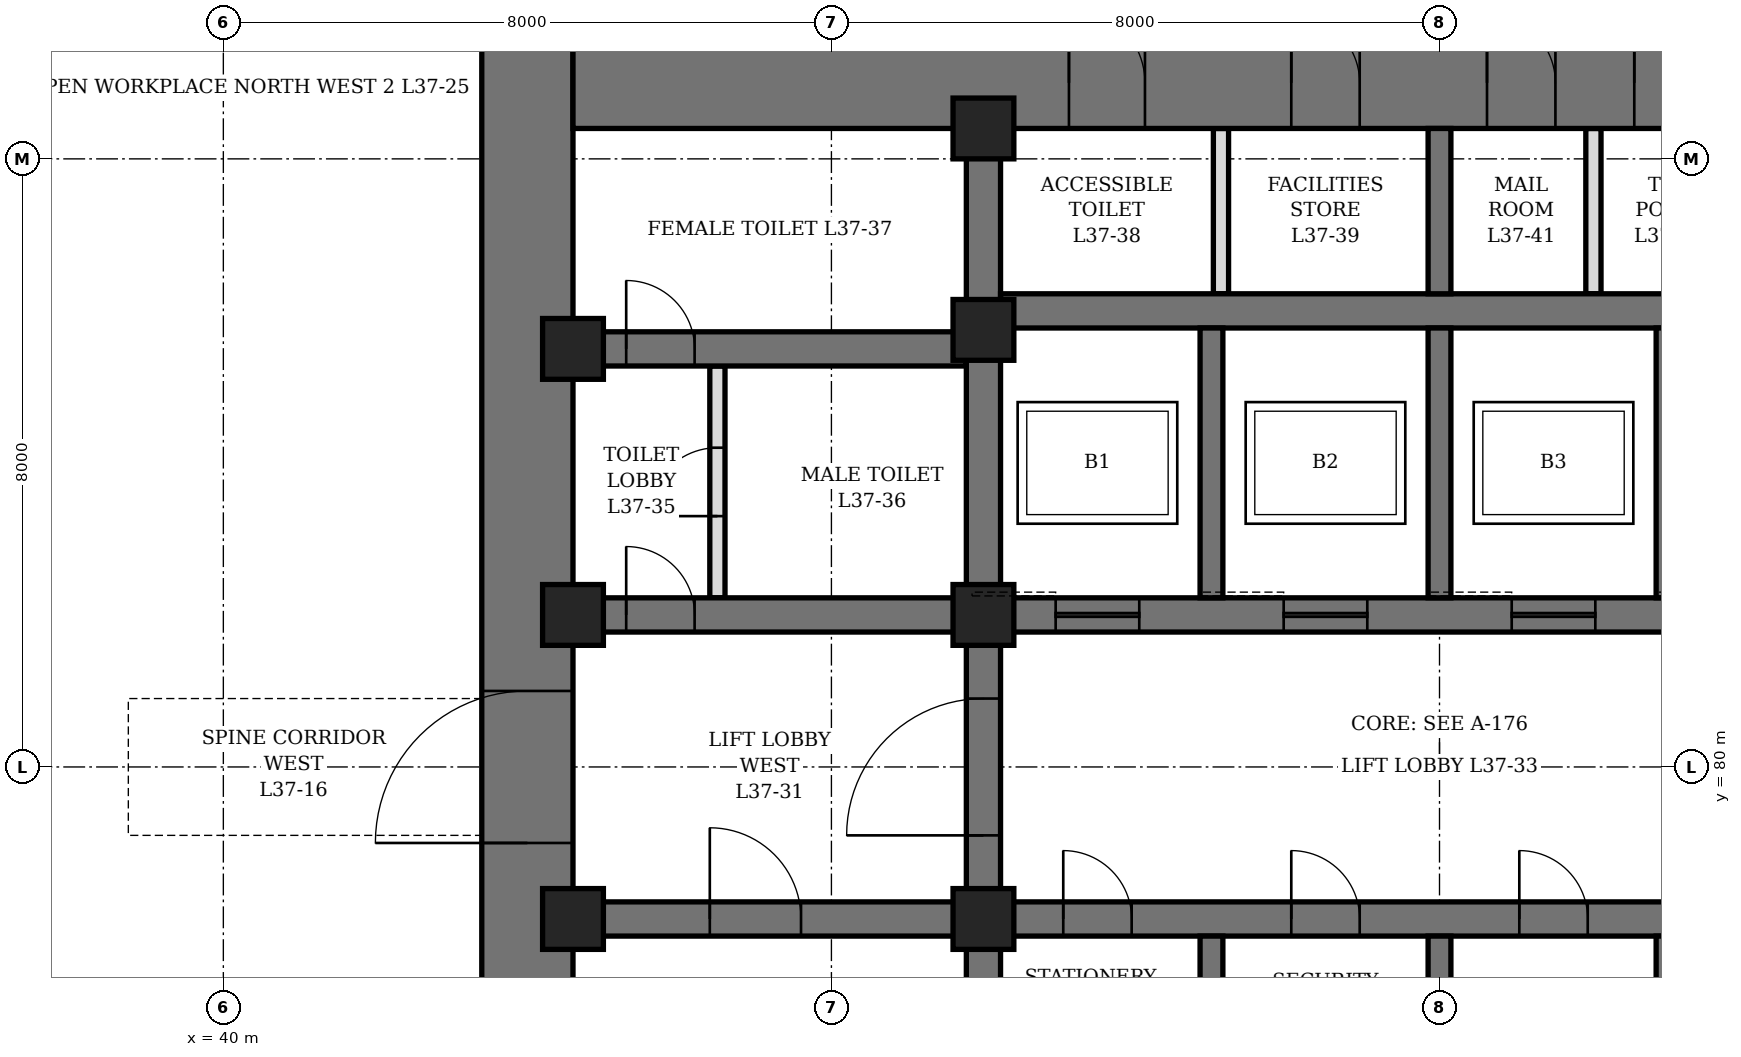
"""IFC4 building model, lengths in metres.
Left out: names, types, materials, properties, quantities, classifications, styles, units other than length and angle.
Written with IfcOpenShell. Run it as: python <this file> out.ifc"""

import sys

from ifc_helpers import new_model, si_unit, direction, frame, frame_2d, origin, origin_2d, place, context, subcontext, project, spatial, rectangle, hollow_rectangle, extrude, element, fill, save


model = new_model("IFC4")
c1 = context("Model", 3, precision=1e-05, world=origin(), true_north=direction((0.0, 1.0)))
c2 = subcontext(c1, "Body", "Model", "MODEL_VIEW")
j1 = project(units=[si_unit("LENGTHUNIT", "METRE"), si_unit("PLANEANGLEUNIT", "RADIAN")], contexts=[c1])
p1 = place(None, origin())
s1 = spatial("IfcSite", under=j1, at=p1, CompositionType="ELEMENT")
p2 = place(p1, origin())
s2 = spatial("IfcBuilding", under=s1, at=p2, CompositionType="ELEMENT")
p3 = place(p2, frame((0.0, 0.0, 166.9)))
s3 = spatial("IfcBuildingStorey", under=s2, at=p3, CompositionType="ELEMENT", Elevation=166.9)
p4 = place(p3, frame((44.0, 70.4, 0.0), z_axis=(0.0, 0.0, 1.0), x_axis=(0.0, 1.0, 0.0)))
e1 = element("IfcWall", 1, at=p4, inside=s3, PredefinedType="SHEAR", context=c2, shape_type="SweptSolid", body=[
    extrude(rectangle(XDim=19.2, YDim=1.2, at=frame_2d((9.6, 0.0))), origin(), (0.0, 0.0, 1.0), 4.2),
])
p5 = place(p4, frame((8.6, 0.0, 0.0)))
e2 = element("IfcOpeningElement", 2, at=p5, cuts=e1, PredefinedType="OPENING", context=c2, shape_type="SweptSolid", body=[
    extrude(rectangle(XDim=2.0, YDim=2.4, at=frame_2d((1.0, 1.2))), frame((0.0, 0.61, 0.0), z_axis=(0.0, -1.0, 0.0), x_axis=(1.0, 0.0, 0.0)), (0.0, 0.0, 1.0), 1.22),
])
p6 = place(p3, frame((44.6, 89.0, 0.0), z_axis=(0.0, 0.0, 1.0), x_axis=(1.0, 0.0, 0.0)))
e3 = element("IfcWall", 3, at=p6, inside=s3, PredefinedType="SHEAR", context=c2, shape_type="SweptSolid", body=[
    extrude(rectangle(XDim=22.8, YDim=1.2, at=frame_2d((11.4, 0.0))), origin(), (0.0, 0.0, 1.0), 4.2),
])
p7 = place(p6, frame((6.525, 0.0, 0.0)))
e4 = element("IfcOpeningElement", 4, at=p7, cuts=e3, PredefinedType="OPENING", context=c2, shape_type="SweptSolid", body=[
    extrude(rectangle(XDim=1.0, YDim=2.1, at=frame_2d((0.5, 1.05))), frame((0.0, 0.61, 0.0), z_axis=(0.0, -1.0, 0.0), x_axis=(1.0, 0.0, 0.0)), (0.0, 0.0, 1.0), 1.22),
])
p8 = place(p6, frame((9.45, 0.0, 0.0)))
e5 = element("IfcOpeningElement", 5, at=p8, cuts=e3, PredefinedType="OPENING", context=c2, shape_type="SweptSolid", body=[
    extrude(rectangle(XDim=0.9, YDim=2.1, at=frame_2d((0.45, 1.05))), frame((0.0, 0.61, 0.0), z_axis=(0.0, -1.0, 0.0), x_axis=(1.0, 0.0, 0.0)), (0.0, 0.0, 1.0), 1.22),
])
p9 = place(p6, frame((12.025, 0.0, 0.0)))
e6 = element("IfcOpeningElement", 6, at=p9, cuts=e3, PredefinedType="OPENING", context=c2, shape_type="SweptSolid", body=[
    extrude(rectangle(XDim=0.9, YDim=2.1, at=frame_2d((0.45, 1.05))), frame((0.0, 0.61, 0.0), z_axis=(0.0, -1.0, 0.0), x_axis=(1.0, 0.0, 0.0)), (0.0, 0.0, 1.0), 1.22),
])
p10 = place(p6, frame((13.962, 0.0, 0.0)))
e7 = element("IfcOpeningElement", 7, at=p10, cuts=e3, PredefinedType="OPENING", context=c2, shape_type="SweptSolid", body=[
    extrude(rectangle(XDim=0.9, YDim=2.1, at=frame_2d((0.45, 1.05))), frame((0.0, 0.61, 0.0), z_axis=(0.0, -1.0, 0.0), x_axis=(1.0, 0.0, 0.0)), (0.0, 0.0, 1.0), 1.22),
])
p11 = place(p3, frame((50.0, 71.6, 0.0), z_axis=(0.0, 0.0, 1.0), x_axis=(0.0, 1.0, 0.0)))
e8 = element("IfcWall", 8, at=p11, inside=s3, PredefinedType="SHEAR", context=c2, shape_type="SweptSolid", body=[
    extrude(rectangle(XDim=16.8, YDim=0.45, at=frame_2d((8.4, 0.0))), origin(), (0.0, 0.0, 1.0), 4.2),
])
p12 = place(p11, frame((7.5, 0.0, 0.0)))
e9 = element("IfcOpeningElement", 9, at=p12, cuts=e8, PredefinedType="OPENING", context=c2, shape_type="SweptSolid", body=[
    extrude(rectangle(XDim=1.8, YDim=2.4, at=frame_2d((0.9, 1.2))), frame((0.0, 0.235, 0.0), z_axis=(0.0, -1.0, 0.0), x_axis=(1.0, 0.0, 0.0)), (0.0, 0.0, 1.0), 0.47),
])
p13 = place(p3, frame((44.6, 78.0, 0.0), z_axis=(0.0, 0.0, 1.0), x_axis=(1.0, 0.0, 0.0)))
e10 = element("IfcWall", 10, at=p13, inside=s3, PredefinedType="SHEAR", context=c2, shape_type="SweptSolid", body=[
    extrude(rectangle(XDim=5.175, YDim=0.45, at=frame_2d((2.587, 0.0))), origin(), (0.0, 0.0, 1.0), 4.2),
])
p14 = place(p13, frame((1.8, 0.0, 0.0)))
e11 = element("IfcOpeningElement", 11, at=p14, cuts=e10, PredefinedType="OPENING", context=c2, shape_type="SweptSolid", body=[
    extrude(rectangle(XDim=1.2, YDim=2.1, at=frame_2d((0.6, 1.05))), frame((0.0, 0.235, 0.0), z_axis=(0.0, -1.0, 0.0), x_axis=(1.0, 0.0, 0.0)), (0.0, 0.0, 1.0), 0.47),
])
p15 = place(p3, frame((44.6, 82.0, 0.0), z_axis=(0.0, 0.0, 1.0), x_axis=(1.0, 0.0, 0.0)))
e12 = element("IfcWall", 12, at=p15, inside=s3, PredefinedType="SHEAR", context=c2, shape_type="SweptSolid", body=[
    extrude(rectangle(XDim=5.175, YDim=0.45, at=frame_2d((2.587, 0.0))), origin(), (0.0, 0.0, 1.0), 4.2),
])
p16 = place(p15, frame((0.7, 0.0, 0.0)))
e13 = element("IfcOpeningElement", 13, at=p16, cuts=e12, PredefinedType="OPENING", context=c2, shape_type="SweptSolid", body=[
    extrude(rectangle(XDim=0.9, YDim=2.1, at=frame_2d((0.45, 1.05))), frame((0.0, 0.235, 0.0), z_axis=(0.0, -1.0, 0.0), x_axis=(1.0, 0.0, 0.0)), (0.0, 0.0, 1.0), 0.47),
])
p17 = place(p3, frame((44.6, 85.5, 0.0), z_axis=(0.0, 0.0, 1.0), x_axis=(1.0, 0.0, 0.0)))
e14 = element("IfcWall", 14, at=p17, inside=s3, PredefinedType="SHEAR", context=c2, shape_type="SweptSolid", body=[
    extrude(rectangle(XDim=5.175, YDim=0.45, at=frame_2d((2.587, 0.0))), origin(), (0.0, 0.0, 1.0), 4.2),
])
p18 = place(p17, frame((0.7, 0.0, 0.0)))
e15 = element("IfcOpeningElement", 15, at=p18, cuts=e14, PredefinedType="OPENING", context=c2, shape_type="SweptSolid", body=[
    extrude(rectangle(XDim=0.9, YDim=2.1, at=frame_2d((0.45, 1.05))), frame((0.0, 0.235, 0.0), z_axis=(0.0, -1.0, 0.0), x_axis=(1.0, 0.0, 0.0)), (0.0, 0.0, 1.0), 0.47),
])
p19 = place(p3, frame((50.225, 78.0, 0.0), z_axis=(0.0, 0.0, 1.0), x_axis=(1.0, 0.0, 0.0)))
e16 = element("IfcWall", 16, at=p19, inside=s3, PredefinedType="SHEAR", context=c2, shape_type="SweptSolid", body=[
    extrude(rectangle(XDim=11.55, YDim=0.45, at=frame_2d((5.775, 0.0))), origin(), (0.0, 0.0, 1.0), 4.2),
])
p20 = place(p19, frame((0.825, 0.0, 0.0)))
e17 = element("IfcOpeningElement", 17, at=p20, cuts=e16, PredefinedType="OPENING", context=c2, shape_type="SweptSolid", body=[
    extrude(rectangle(XDim=0.9, YDim=2.1, at=frame_2d((0.45, 1.05))), frame((0.0, 0.235, 0.0), z_axis=(0.0, -1.0, 0.0), x_axis=(1.0, 0.0, 0.0)), (0.0, 0.0, 1.0), 0.47),
])
p21 = place(p19, frame((3.825, 0.0, 0.0)))
e18 = element("IfcOpeningElement", 18, at=p21, cuts=e16, PredefinedType="OPENING", context=c2, shape_type="SweptSolid", body=[
    extrude(rectangle(XDim=0.9, YDim=2.1, at=frame_2d((0.45, 1.05))), frame((0.0, 0.235, 0.0), z_axis=(0.0, -1.0, 0.0), x_axis=(1.0, 0.0, 0.0)), (0.0, 0.0, 1.0), 0.47),
])
p22 = place(p19, frame((6.825, 0.0, 0.0)))
e19 = element("IfcOpeningElement", 19, at=p22, cuts=e16, PredefinedType="OPENING", context=c2, shape_type="SweptSolid", body=[
    extrude(rectangle(XDim=0.9, YDim=2.1, at=frame_2d((0.45, 1.05))), frame((0.0, 0.235, 0.0), z_axis=(0.0, -1.0, 0.0), x_axis=(1.0, 0.0, 0.0)), (0.0, 0.0, 1.0), 0.47),
])
p23 = place(p19, frame((9.825, 0.0, 0.0)))
e20 = element("IfcOpeningElement", 20, at=p23, cuts=e16, PredefinedType="OPENING", context=c2, shape_type="SweptSolid", body=[
    extrude(rectangle(XDim=0.9, YDim=2.1, at=frame_2d((0.45, 1.05))), frame((0.0, 0.235, 0.0), z_axis=(0.0, -1.0, 0.0), x_axis=(1.0, 0.0, 0.0)), (0.0, 0.0, 1.0), 0.47),
])
p24 = place(p3, frame((50.225, 82.0, 0.0), z_axis=(0.0, 0.0, 1.0), x_axis=(1.0, 0.0, 0.0)))
e21 = element("IfcWall", 21, at=p24, inside=s3, PredefinedType="SHEAR", context=c2, shape_type="SweptSolid", body=[
    extrude(rectangle(XDim=11.55, YDim=0.45, at=frame_2d((5.775, 0.0))), origin(), (0.0, 0.0, 1.0), 4.2),
])
p25 = place(p24, frame((0.725, 0.0, 0.0)))
e22 = element("IfcOpeningElement", 22, at=p25, cuts=e21, PredefinedType="OPENING", context=c2, shape_type="SweptSolid", body=[
    extrude(rectangle(XDim=1.1, YDim=2.2, at=frame_2d((0.55, 1.1))), frame((0.0, 0.235, 0.0), z_axis=(0.0, -1.0, 0.0), x_axis=(1.0, 0.0, 0.0)), (0.0, 0.0, 1.0), 0.47),
])
p26 = place(p24, frame((3.725, 0.0, 0.0)))
e23 = element("IfcOpeningElement", 23, at=p26, cuts=e21, PredefinedType="OPENING", context=c2, shape_type="SweptSolid", body=[
    extrude(rectangle(XDim=1.1, YDim=2.2, at=frame_2d((0.55, 1.1))), frame((0.0, 0.235, 0.0), z_axis=(0.0, -1.0, 0.0), x_axis=(1.0, 0.0, 0.0)), (0.0, 0.0, 1.0), 0.47),
])
p27 = place(p24, frame((6.725, 0.0, 0.0)))
e24 = element("IfcOpeningElement", 24, at=p27, cuts=e21, PredefinedType="OPENING", context=c2, shape_type="SweptSolid", body=[
    extrude(rectangle(XDim=1.1, YDim=2.2, at=frame_2d((0.55, 1.1))), frame((0.0, 0.235, 0.0), z_axis=(0.0, -1.0, 0.0), x_axis=(1.0, 0.0, 0.0)), (0.0, 0.0, 1.0), 0.47),
])
p28 = place(p24, frame((9.725, 0.0, 0.0)))
e25 = element("IfcOpeningElement", 25, at=p28, cuts=e21, PredefinedType="OPENING", context=c2, shape_type="SweptSolid", body=[
    extrude(rectangle(XDim=1.1, YDim=2.2, at=frame_2d((0.55, 1.1))), frame((0.0, 0.235, 0.0), z_axis=(0.0, -1.0, 0.0), x_axis=(1.0, 0.0, 0.0)), (0.0, 0.0, 1.0), 0.47),
])
p29 = place(p3, frame((50.225, 86.0, 0.0), z_axis=(0.0, 0.0, 1.0), x_axis=(1.0, 0.0, 0.0)))
e26 = element("IfcWall", 26, at=p29, inside=s3, PredefinedType="SHEAR", context=c2, shape_type="SweptSolid", body=[
    extrude(rectangle(XDim=11.55, YDim=0.45, at=frame_2d((5.775, 0.0))), origin(), (0.0, 0.0, 1.0), 4.2),
])
p30 = place(p3, frame((53.0, 74.15, 0.0), z_axis=(0.0, 0.0, 1.0), x_axis=(0.0, 1.0, 0.0)))
e27 = element("IfcWall", 27, at=p30, inside=s3, PredefinedType="SHEAR", context=c2, shape_type="SweptSolid", body=[
    extrude(rectangle(XDim=3.625, YDim=0.3, at=frame_2d((1.812, 0.0))), origin(), (0.0, 0.0, 1.0), 4.2),
])
p31 = place(p3, frame((53.0, 82.225, 0.0), z_axis=(0.0, 0.0, 1.0), x_axis=(0.0, 1.0, 0.0)))
e28 = element("IfcWall", 28, at=p31, inside=s3, PredefinedType="SHEAR", context=c2, shape_type="SweptSolid", body=[
    extrude(rectangle(XDim=3.55, YDim=0.3, at=frame_2d((1.775, 0.0))), origin(), (0.0, 0.0, 1.0), 4.2),
])
p32 = place(p3, frame((56.0, 74.15, 0.0), z_axis=(0.0, 0.0, 1.0), x_axis=(0.0, 1.0, 0.0)))
e29 = element("IfcWall", 29, at=p32, inside=s3, PredefinedType="SHEAR", context=c2, shape_type="SweptSolid", body=[
    extrude(rectangle(XDim=3.625, YDim=0.3, at=frame_2d((1.812, 0.0))), origin(), (0.0, 0.0, 1.0), 4.2),
])
p33 = place(p3, frame((56.0, 82.225, 0.0), z_axis=(0.0, 0.0, 1.0), x_axis=(0.0, 1.0, 0.0)))
e30 = element("IfcWall", 30, at=p33, inside=s3, PredefinedType="SHEAR", context=c2, shape_type="SweptSolid", body=[
    extrude(rectangle(XDim=3.55, YDim=0.3, at=frame_2d((1.775, 0.0))), origin(), (0.0, 0.0, 1.0), 4.2),
])
p34 = place(p3, frame((59.0, 74.15, 0.0), z_axis=(0.0, 0.0, 1.0), x_axis=(0.0, 1.0, 0.0)))
e31 = element("IfcWall", 31, at=p34, inside=s3, PredefinedType="SHEAR", context=c2, shape_type="SweptSolid", body=[
    extrude(rectangle(XDim=3.625, YDim=0.3, at=frame_2d((1.812, 0.0))), origin(), (0.0, 0.0, 1.0), 4.2),
])
p35 = place(p3, frame((59.0, 82.225, 0.0), z_axis=(0.0, 0.0, 1.0), x_axis=(0.0, 1.0, 0.0)))
e32 = element("IfcWall", 32, at=p35, inside=s3, PredefinedType="SHEAR", context=c2, shape_type="SweptSolid", body=[
    extrude(rectangle(XDim=3.55, YDim=0.3, at=frame_2d((1.775, 0.0))), origin(), (0.0, 0.0, 1.0), 4.2),
])
p36 = place(p3, frame((56.0, 86.225, 0.0), z_axis=(0.0, 0.0, 1.0), x_axis=(0.0, 1.0, 0.0)))
e33 = element("IfcWall", 33, at=p36, inside=s3, PredefinedType="SHEAR", context=c2, shape_type="SweptSolid", body=[
    extrude(rectangle(XDim=2.175, YDim=0.3, at=frame_2d((1.087, 0.0))), origin(), (0.0, 0.0, 1.0), 4.2),
])
for number, where, z_axis, x_axis in (
    (34, (44.6, 78.0, 0.0), (0.0, 0.0, 1.0), (1.0, 0.0, 0.0)),
    (35, (44.6, 82.0, 0.0), (0.0, 0.0, 1.0), (1.0, 0.0, 0.0)),
    (36, (44.6, 85.5, 0.0), (0.0, 0.0, 1.0), (1.0, 0.0, 0.0)),
    (37, (50.0, 78.0, 0.0), (0.0, 0.0, 1.0), (1.0, 0.0, 0.0)),
    (38, (50.0, 82.0, 0.0), (0.0, 0.0, 1.0), (1.0, 0.0, 0.0)),
    (39, (50.0, 85.75, 0.0), (0.0, 0.0, 1.0), (1.0, 0.0, 0.0)),
    (40, (50.0, 88.4, 0.0), (0.0, 0.0, 1.0), (1.0, 0.0, 0.0)),
):
    element("IfcColumn", number, at=place(p3, frame(where, z_axis=z_axis, x_axis=x_axis)), inside=s3, PredefinedType="COLUMN", context=c2, shape_type="SweptSolid", body=[
        extrude(hollow_rectangle(XDim=0.8, YDim=0.8, WallThickness=0.1, at=origin_2d()), origin(), (0.0, 0.0, 1.0), 4.2),
    ])
p37 = place(p3, frame((46.5, 82.225, 0.0), z_axis=(0.0, 0.0, 1.0), x_axis=(0.0, 1.0, 0.0)))
e41 = element("IfcWall", 41, at=p37, inside=s3, PredefinedType="PARTITIONING", context=c2, shape_type="SweptSolid", body=[
    extrude(rectangle(XDim=3.05, YDim=0.2, at=frame_2d((1.525, 0.0))), origin(), (0.0, 0.0, 1.0), 4.04),
])
p38 = place(p37, frame((1.075, 0.0, 0.0)))
e42 = element("IfcOpeningElement", 42, at=p38, cuts=e41, PredefinedType="OPENING", context=c2, shape_type="SweptSolid", body=[
    extrude(rectangle(XDim=0.9, YDim=2.1, at=frame_2d((0.45, 1.05))), frame((0.0, 0.11, 0.0), z_axis=(0.0, -1.0, 0.0), x_axis=(1.0, 0.0, 0.0)), (0.0, 0.0, 1.0), 0.22),
])
p39 = place(p3, frame((53.125, 86.225, 0.0), z_axis=(0.0, 0.0, 1.0), x_axis=(0.0, 1.0, 0.0)))
e43 = element("IfcWall", 43, at=p39, inside=s3, PredefinedType="PARTITIONING", context=c2, shape_type="SweptSolid", body=[
    extrude(rectangle(XDim=2.175, YDim=0.2, at=frame_2d((1.087, 0.0))), origin(), (0.0, 0.0, 1.0), 2.54),
])
p40 = place(p3, frame((58.025, 86.225, 0.0), z_axis=(0.0, 0.0, 1.0), x_axis=(0.0, 1.0, 0.0)))
e44 = element("IfcWall", 44, at=p40, inside=s3, PredefinedType="PARTITIONING", context=c2, shape_type="SweptSolid", body=[
    extrude(rectangle(XDim=2.175, YDim=0.2, at=frame_2d((1.087, 0.0))), origin(), (0.0, 0.0, 1.0), 4.04),
])
p41 = place(p16, origin())
e45 = element("IfcDoor", 45, at=p41, inside=s3, OperationType="SINGLE_SWING_LEFT", PredefinedType="DOOR", context=c2, shape_type="SweptSolid", body=[
    extrude(rectangle(XDim=0.9, YDim=2.1, at=frame_2d((0.45, 1.05))), frame((0.0, 0.225, 0.0), z_axis=(0.0, -1.0, 0.0), x_axis=(1.0, 0.0, 0.0)), (0.0, 0.0, 1.0), 0.449),
])
fill(e13, e45)
p42 = place(p38, origin())
e46 = element("IfcDoor", 46, at=p42, inside=s3, OperationType="SINGLE_SWING_RIGHT", PredefinedType="DOOR", context=c2, shape_type="SweptSolid", body=[
    extrude(rectangle(XDim=0.9, YDim=2.1, at=frame_2d((0.45, 1.05))), frame((0.0, 0.1, 0.0), z_axis=(0.0, -1.0, 0.0), x_axis=(1.0, 0.0, 0.0)), (0.0, 0.0, 1.0), 0.199),
])
fill(e42, e46)
p43 = place(p18, origin())
e47 = element("IfcDoor", 47, at=p43, inside=s3, OperationType="SINGLE_SWING_RIGHT", PredefinedType="DOOR", context=c2, shape_type="SweptSolid", body=[
    extrude(rectangle(XDim=0.9, YDim=2.1, at=frame_2d((0.45, 1.05))), frame((0.0, 0.225, 0.0), z_axis=(0.0, -1.0, 0.0), x_axis=(1.0, 0.0, 0.0)), (0.0, 0.0, 1.0), 0.449),
])
fill(e15, e47)
p44 = place(p7, origin())
e48 = element("IfcDoor", 48, at=p44, inside=s3, OperationType="SINGLE_SWING_LEFT", PredefinedType="DOOR", context=c2, shape_type="SweptSolid", body=[
    extrude(rectangle(XDim=1.0, YDim=2.1, at=frame_2d((0.5, 1.05))), frame((0.0, 0.35, 0.0), z_axis=(0.0, -1.0, 0.0), x_axis=(1.0, 0.0, 0.0)), (0.0, 0.0, 1.0), 0.7),
])
fill(e4, e48)
p45 = place(p8, origin())
e49 = element("IfcDoor", 49, at=p45, inside=s3, OperationType="SINGLE_SWING_LEFT", PredefinedType="DOOR", context=c2, shape_type="SweptSolid", body=[
    extrude(rectangle(XDim=0.9, YDim=2.1, at=frame_2d((0.45, 1.05))), frame((0.0, 0.35, 0.0), z_axis=(0.0, -1.0, 0.0), x_axis=(1.0, 0.0, 0.0)), (0.0, 0.0, 1.0), 0.7),
])
fill(e5, e49)
p46 = place(p9, origin())
e50 = element("IfcDoor", 50, at=p46, inside=s3, OperationType="SINGLE_SWING_LEFT", PredefinedType="DOOR", context=c2, shape_type="SweptSolid", body=[
    extrude(rectangle(XDim=0.9, YDim=2.1, at=frame_2d((0.45, 1.05))), frame((0.0, 0.35, 0.0), z_axis=(0.0, -1.0, 0.0), x_axis=(1.0, 0.0, 0.0)), (0.0, 0.0, 1.0), 0.7),
])
fill(e6, e50)
p47 = place(p10, origin())
e51 = element("IfcDoor", 51, at=p47, inside=s3, OperationType="SINGLE_SWING_LEFT", PredefinedType="DOOR", context=c2, shape_type="SweptSolid", body=[
    extrude(rectangle(XDim=0.9, YDim=2.1, at=frame_2d((0.45, 1.05))), frame((0.0, 0.35, 0.0), z_axis=(0.0, -1.0, 0.0), x_axis=(1.0, 0.0, 0.0)), (0.0, 0.0, 1.0), 0.7),
])
fill(e7, e51)
p48 = place(p20, origin())
e52 = element("IfcDoor", 52, at=p48, inside=s3, OperationType="SINGLE_SWING_LEFT", PredefinedType="DOOR", context=c2, shape_type="SweptSolid", body=[
    extrude(rectangle(XDim=0.9, YDim=2.1, at=frame_2d((0.45, 1.05))), frame((0.0, 0.225, 0.0), z_axis=(0.0, -1.0, 0.0), x_axis=(1.0, 0.0, 0.0)), (0.0, 0.0, 1.0), 0.449),
])
fill(e17, e52)
p49 = place(p21, origin())
e53 = element("IfcDoor", 53, at=p49, inside=s3, OperationType="SINGLE_SWING_LEFT", PredefinedType="DOOR", context=c2, shape_type="SweptSolid", body=[
    extrude(rectangle(XDim=0.9, YDim=2.1, at=frame_2d((0.45, 1.05))), frame((0.0, 0.225, 0.0), z_axis=(0.0, -1.0, 0.0), x_axis=(1.0, 0.0, 0.0)), (0.0, 0.0, 1.0), 0.449),
])
fill(e18, e53)
p50 = place(p22, origin())
e54 = element("IfcDoor", 54, at=p50, inside=s3, OperationType="SINGLE_SWING_LEFT", PredefinedType="DOOR", context=c2, shape_type="SweptSolid", body=[
    extrude(rectangle(XDim=0.9, YDim=2.1, at=frame_2d((0.45, 1.05))), frame((0.0, 0.225, 0.0), z_axis=(0.0, -1.0, 0.0), x_axis=(1.0, 0.0, 0.0)), (0.0, 0.0, 1.0), 0.449),
])
fill(e19, e54)
p51 = place(p14, origin())
e55 = element("IfcDoor", 55, at=p51, inside=s3, OperationType="SINGLE_SWING_LEFT", PredefinedType="DOOR", context=c2, shape_type="SweptSolid", body=[
    extrude(rectangle(XDim=1.2, YDim=2.1, at=frame_2d((0.6, 1.05))), frame((0.0, 0.225, 0.0), z_axis=(0.0, -1.0, 0.0), x_axis=(1.0, 0.0, 0.0)), (0.0, 0.0, 1.0), 0.449),
])
fill(e11, e55)
p52 = place(p5, origin())
e56 = element("IfcDoor", 56, at=p52, inside=s3, OperationType="DOUBLE_DOOR_SINGLE_SWING", PredefinedType="DOOR", context=c2, shape_type="SweptSolid", body=[
    extrude(rectangle(XDim=2.0, YDim=2.4, at=frame_2d((1.0, 1.2))), frame((0.0, 0.35, 0.0), z_axis=(0.0, -1.0, 0.0), x_axis=(1.0, 0.0, 0.0)), (0.0, 0.0, 1.0), 0.7),
])
fill(e2, e56)
p53 = place(p12, origin())
e57 = element("IfcDoor", 57, at=p53, inside=s3, OperationType="DOUBLE_DOOR_SINGLE_SWING", PredefinedType="DOOR", context=c2, shape_type="SweptSolid", body=[
    extrude(rectangle(XDim=1.8, YDim=2.4, at=frame_2d((0.9, 1.2))), frame((0.0, 0.225, 0.0), z_axis=(0.0, -1.0, 0.0), x_axis=(1.0, 0.0, 0.0)), (0.0, 0.0, 1.0), 0.449),
])
fill(e9, e57)
p54 = place(p25, origin())
e58 = element("IfcDoor", 58, at=p54, inside=s3, OperationType="SLIDING_TO_LEFT", PredefinedType="DOOR", context=c2, shape_type="SweptSolid", body=[
    extrude(rectangle(XDim=1.1, YDim=2.2, at=frame_2d((0.55, 1.1))), frame((0.0, 0.225, 0.0), z_axis=(0.0, -1.0, 0.0), x_axis=(1.0, 0.0, 0.0)), (0.0, 0.0, 1.0), 0.449),
])
fill(e22, e58)
p55 = place(p26, origin())
e59 = element("IfcDoor", 59, at=p55, inside=s3, OperationType="SLIDING_TO_LEFT", PredefinedType="DOOR", context=c2, shape_type="SweptSolid", body=[
    extrude(rectangle(XDim=1.1, YDim=2.2, at=frame_2d((0.55, 1.1))), frame((0.0, 0.225, 0.0), z_axis=(0.0, -1.0, 0.0), x_axis=(1.0, 0.0, 0.0)), (0.0, 0.0, 1.0), 0.449),
])
fill(e23, e59)
p56 = place(p27, origin())
e60 = element("IfcDoor", 60, at=p56, inside=s3, OperationType="SLIDING_TO_LEFT", PredefinedType="DOOR", context=c2, shape_type="SweptSolid", body=[
    extrude(rectangle(XDim=1.1, YDim=2.2, at=frame_2d((0.55, 1.1))), frame((0.0, 0.225, 0.0), z_axis=(0.0, -1.0, 0.0), x_axis=(1.0, 0.0, 0.0)), (0.0, 0.0, 1.0), 0.449),
])
fill(e24, e60)
save(model, sys.argv[1])
